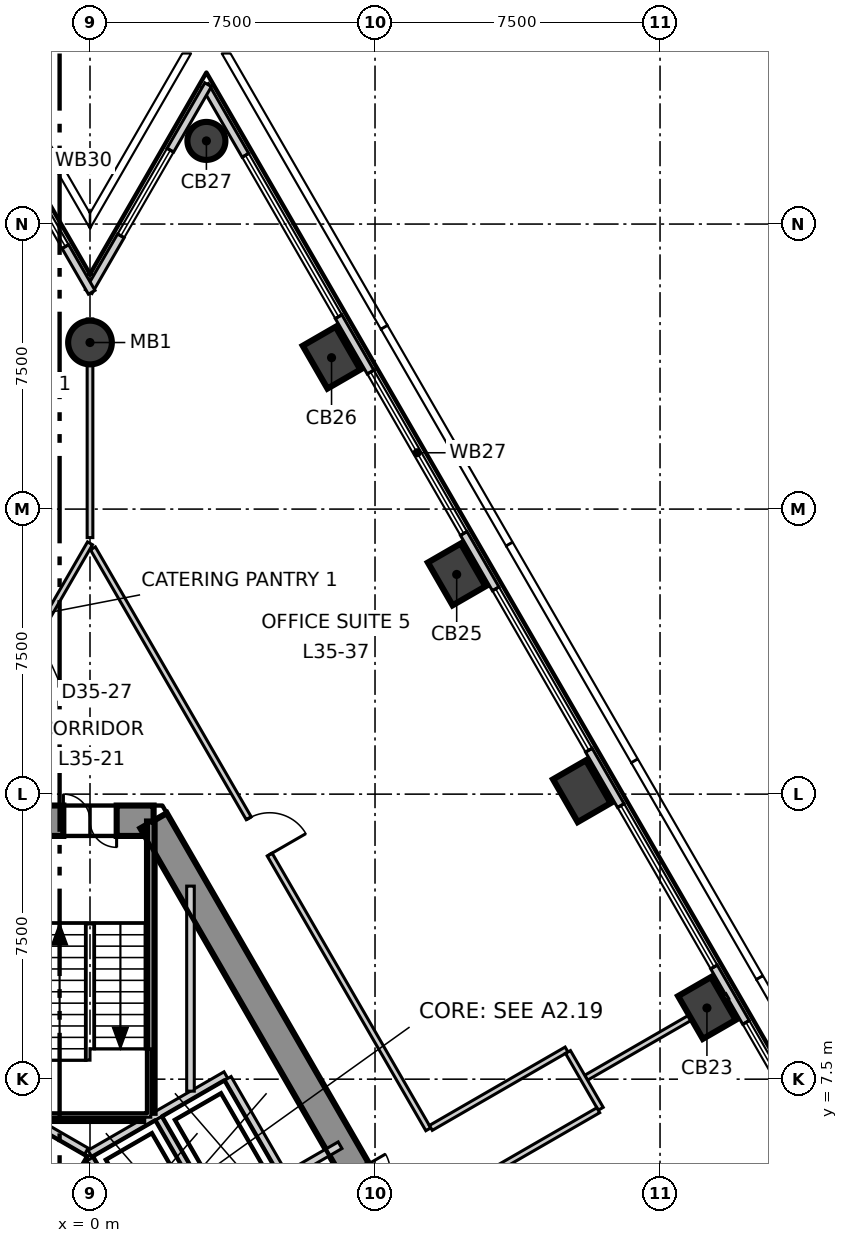
"""IFC4 building model, lengths in metres.
Left out: names, types, materials, properties, quantities, classifications, styles, units other than length and angle.
Written with IfcOpenShell. Run it as: python <this file> out.ifc"""

import sys

from ifc_helpers import new_model, si_unit, direction, frame, frame_2d, origin, origin_2d, place, context, subcontext, project, spatial, polyline, rectangle, circle, outline, extrude, element, fill, save


model = new_model("IFC4")
c1 = context("Model", 3, precision=1e-05, world=origin(), true_north=direction((0.0, 1.0)))
c2 = subcontext(c1, "Body", "Model", "MODEL_VIEW")
j1 = project(units=[si_unit("LENGTHUNIT", "METRE"), si_unit("PLANEANGLEUNIT", "RADIAN")], contexts=[c1])
p1 = place(None, origin())
s1 = spatial("IfcSite", under=j1, at=p1, CompositionType="ELEMENT")
p2 = place(p1, origin())
s2 = spatial("IfcBuilding", under=s1, at=p2, CompositionType="ELEMENT")
p3 = place(p2, frame((0.0, 0.0, 152.3)))
s3 = spatial("IfcBuildingStorey", under=s2, at=p3, CompositionType="ELEMENT", Elevation=152.3)
p4 = place(p3, frame((1.674, 14.3, -0.3), z_axis=(0.0, 0.0, 1.0), x_axis=(-1.0, 0.0, 0.0)))
e1 = element("IfcWall", 1, at=p4, inside=s3, PredefinedType="SHEAR", context=c2, shape_type="SweptSolid", body=[
    extrude(outline(polyline([(-0.231, -0.4), (1.674, -0.4), (3.579, -0.4), (3.117, 0.4), (1.674, 0.4), (0.231, 0.4), (-0.231, -0.4)])), origin(), (0.0, 0.0, 1.0), 4.0),
])
p5 = place(p4, frame((0.974, 0.0, 0.3)))
e2 = element("IfcOpeningElement", 2, at=p5, cuts=e1, PredefinedType="OPENING", context=c2, shape_type="SweptSolid", body=[
    extrude(rectangle(XDim=1.4, YDim=2.1, at=frame_2d((0.7, 1.05))), frame((0.0, 0.41, 0.0), z_axis=(0.0, -1.0, 0.0), x_axis=(1.0, 0.0, 0.0)), (0.0, 0.0, 1.0), 0.82),
])
p6 = place(p3, frame((13.221, -5.7, -0.3), z_axis=(0.0, 0.0, 1.0), x_axis=(-0.499995765644, 0.866027848477, 0.0)))
e3 = element("IfcWall", 3, at=p6, inside=s3, PredefinedType="SHEAR", context=c2, shape_type="SweptSolid", body=[
    extrude(outline(polyline([(-0.231, -0.4), (1.732, -0.4), (3.695, -0.4), (5.658, -0.4), (7.621, -0.4), (9.584, -0.4), (11.547, -0.4), (13.51, -0.4), (15.473, -0.4), (17.436, -0.4), (19.399, -0.4), (21.362, -0.4), (23.325, -0.4), (22.863, 0.4), (20.977, 0.4), (19.091, 0.4), (17.205, 0.4), (15.319, 0.4), (13.433, 0.4), (11.547, 0.4), (9.661, 0.4), (7.775, 0.4), (5.889, 0.4), (4.003, 0.4), (2.117, 0.4), (0.231, 0.4), (-0.231, -0.4)])), origin(), (0.0, 0.0, 1.0), 4.0),
])
p7 = place(p6, frame((10.647, 0.0, 0.3)))
e4 = element("IfcOpeningElement", 4, at=p7, cuts=e3, PredefinedType="OPENING", context=c2, shape_type="SweptSolid", body=[
    extrude(rectangle(XDim=1.8, YDim=2.1, at=frame_2d((0.9, 1.05))), frame((0.0, 0.41, 0.0), z_axis=(0.0, -1.0, 0.0), x_axis=(1.0, 0.0, 0.0)), (0.0, 0.0, 1.0), 0.82),
])
for number, where, z_axis, x_axis in (
    (5, (16.234, 9.373, -0.3), (0.0, 0.0, 1.0), (-0.5, 0.866, 0.0)),
    (6, (12.942, 15.077, -0.3), (0.0, 0.0, 1.0), (-0.5, 0.866, 0.0)),
    (7, (9.649, 20.781, -0.3), (0.0, 0.0, 1.0), (-0.5, 0.866, 0.0)),
    (8, (6.356, 26.484, -0.3), (0.0, 0.0, 1.0), (-0.5, 0.866, 0.0)),
):
    element("IfcColumn", number, at=place(p3, frame(where, z_axis=z_axis, x_axis=x_axis)), inside=s3, PredefinedType="COLUMN", context=c2, shape_type="SweptSolid", body=[
        extrude(rectangle(XDim=1.3, YDim=1.0, at=origin_2d()), origin(), (0.0, 0.0, 1.0), 4.0),
    ])
p8 = place(p3, frame((3.063, 32.188, -0.3), z_axis=(0.0, 0.0, 1.0), x_axis=(-0.5, 0.866025403784, 0.0)))
e9 = element("IfcColumn", 9, at=p8, inside=s3, PredefinedType="COLUMN", context=c2, shape_type="SweptSolid", body=[
    extrude(circle(Radius=0.5, at=origin_2d()), origin(), (0.0, 0.0, 1.0), 4.0),
])
p9 = place(p3, frame((0.0, 26.883, -0.3), z_axis=(0.0, 0.0, 1.0), x_axis=(1.0, 0.0, 0.0)))
e10 = element("IfcColumn", 10, at=p9, inside=s3, PredefinedType="COLUMN", context=c2, shape_type="SweptSolid", body=[
    extrude(circle(Radius=0.575, at=origin_2d()), origin(), (0.0, 0.0, 1.0), 4.0),
])
p10 = place(p3, frame((30.664, -14.22, 0.0), z_axis=(0.0, 0.0, 1.0), x_axis=(-0.499984613623, 0.866034286931, 0.0)))
e11 = element("IfcWall", 11, at=p10, inside=s3, PredefinedType="ELEMENTEDWALL", context=c2, shape_type="SweptSolid", body=[
    extrude(rectangle(XDim=55.274, YDim=0.2, at=frame_2d((27.637, 0.0))), origin(), (0.0, 0.0, 1.0), 3.7),
])
p11 = place(p10, frame((2.146, 0.0, 0.9)))
e12 = element("IfcOpeningElement", 12, at=p11, cuts=e11, PredefinedType="OPENING", context=c2, shape_type="SweptSolid", body=[
    extrude(rectangle(XDim=4.9, YDim=2.5, at=frame_2d((2.45, 1.25))), frame((0.0, 0.11, 0.0), z_axis=(0.0, -1.0, 0.0), x_axis=(1.0, 0.0, 0.0)), (0.0, 0.0, 1.0), 0.22),
])
p12 = place(p10, frame((8.732, 0.0, 0.9)))
e13 = element("IfcOpeningElement", 13, at=p12, cuts=e11, PredefinedType="OPENING", context=c2, shape_type="SweptSolid", body=[
    extrude(rectangle(XDim=4.9, YDim=2.5, at=frame_2d((2.45, 1.25))), frame((0.0, 0.11, 0.0), z_axis=(0.0, -1.0, 0.0), x_axis=(1.0, 0.0, 0.0)), (0.0, 0.0, 1.0), 0.22),
])
p13 = place(p10, frame((15.318, 0.0, 0.9)))
e14 = element("IfcOpeningElement", 14, at=p13, cuts=e11, PredefinedType="OPENING", context=c2, shape_type="SweptSolid", body=[
    extrude(rectangle(XDim=4.9, YDim=2.5, at=frame_2d((2.45, 1.25))), frame((0.0, 0.11, 0.0), z_axis=(0.0, -1.0, 0.0), x_axis=(1.0, 0.0, 0.0)), (0.0, 0.0, 1.0), 0.22),
])
p14 = place(p10, frame((21.904, 0.0, 0.9)))
e15 = element("IfcOpeningElement", 15, at=p14, cuts=e11, PredefinedType="OPENING", context=c2, shape_type="SweptSolid", body=[
    extrude(rectangle(XDim=4.9, YDim=2.5, at=frame_2d((2.45, 1.25))), frame((0.0, 0.11, 0.0), z_axis=(0.0, -1.0, 0.0), x_axis=(1.0, 0.0, 0.0)), (0.0, 0.0, 1.0), 0.22),
])
p15 = place(p10, frame((28.49, 0.0, 0.9)))
e16 = element("IfcOpeningElement", 16, at=p15, cuts=e11, PredefinedType="OPENING", context=c2, shape_type="SweptSolid", body=[
    extrude(rectangle(XDim=4.9, YDim=2.5, at=frame_2d((2.45, 1.25))), frame((0.0, 0.11, 0.0), z_axis=(0.0, -1.0, 0.0), x_axis=(1.0, 0.0, 0.0)), (0.0, 0.0, 1.0), 0.22),
])
p16 = place(p10, frame((35.076, 0.0, 0.9)))
e17 = element("IfcOpeningElement", 17, at=p16, cuts=e11, PredefinedType="OPENING", context=c2, shape_type="SweptSolid", body=[
    extrude(rectangle(XDim=4.9, YDim=2.5, at=frame_2d((2.45, 1.25))), frame((0.0, 0.11, 0.0), z_axis=(0.0, -1.0, 0.0), x_axis=(1.0, 0.0, 0.0)), (0.0, 0.0, 1.0), 0.22),
])
p17 = place(p10, frame((41.662, 0.0, 0.9)))
e18 = element("IfcOpeningElement", 18, at=p17, cuts=e11, PredefinedType="OPENING", context=c2, shape_type="SweptSolid", body=[
    extrude(rectangle(XDim=4.9, YDim=2.5, at=frame_2d((2.45, 1.25))), frame((0.0, 0.11, 0.0), z_axis=(0.0, -1.0, 0.0), x_axis=(1.0, 0.0, 0.0)), (0.0, 0.0, 1.0), 0.22),
])
p18 = place(p10, frame((48.248, 0.0, 0.9)))
e19 = element("IfcOpeningElement", 19, at=p18, cuts=e11, PredefinedType="OPENING", context=c2, shape_type="SweptSolid", body=[
    extrude(rectangle(XDim=4.9, YDim=2.5, at=frame_2d((2.45, 1.25))), frame((0.0, 0.11, 0.0), z_axis=(0.0, -1.0, 0.0), x_axis=(1.0, 0.0, 0.0)), (0.0, 0.0, 1.0), 0.22),
])
p19 = place(p3, frame((3.108, 33.666, 0.0), z_axis=(0.0, 0.0, 1.0), x_axis=(-0.499961152228, -0.866047831394, 0.0)))
e20 = element("IfcWall", 20, at=p19, inside=s3, PredefinedType="ELEMENTEDWALL", context=c2, shape_type="SweptSolid", body=[
    extrude(rectangle(XDim=6.286, YDim=0.2, at=frame_2d((3.143, 0.0))), origin(), (0.0, 0.0, 1.0), 3.7),
])
p20 = place(p19, frame((1.99, 0.0, 0.9)))
e21 = element("IfcOpeningElement", 21, at=p20, cuts=e20, PredefinedType="OPENING", context=c2, shape_type="SweptSolid", body=[
    extrude(rectangle(XDim=2.6, YDim=2.5, at=frame_2d((1.3, 1.25))), frame((0.0, 0.11, 0.0), z_axis=(0.0, -1.0, 0.0), x_axis=(1.0, 0.0, 0.0)), (0.0, 0.0, 1.0), 0.22),
])
p21 = place(p3, frame((0.045, 28.205, 0.0), z_axis=(0.0, 0.0, 1.0), x_axis=(-0.499977969162, 0.866038122921, 0.0)))
e22 = element("IfcWall", 22, at=p21, inside=s3, PredefinedType="ELEMENTEDWALL", context=c2, shape_type="SweptSolid", body=[
    extrude(rectangle(XDim=6.286, YDim=0.2, at=frame_2d((3.143, 0.0))), origin(), (0.0, 0.0, 1.0), 3.7),
])
p22 = place(p21, frame((1.39, 0.0, 0.9)))
e23 = element("IfcOpeningElement", 23, at=p22, cuts=e22, PredefinedType="OPENING", context=c2, shape_type="SweptSolid", body=[
    extrude(rectangle(XDim=2.6, YDim=2.5, at=frame_2d((1.3, 1.25))), frame((0.0, 0.11, 0.0), z_axis=(0.0, -1.0, 0.0), x_axis=(1.0, 0.0, 0.0)), (0.0, 0.0, 1.0), 0.22),
])
p23 = place(p3, frame((13.055, 7.538, 0.0), z_axis=(0.0, 0.0, 1.0), x_axis=(0.866070942811, 0.499921115796, 0.0)))
e24 = element("IfcWall", 24, at=p23, inside=s3, PredefinedType="PARTITIONING", context=c2, shape_type="SweptSolid", body=[
    extrude(rectangle(XDim=4.291, YDim=0.15, at=frame_2d((2.146, 0.0))), origin(), (0.0, 0.0, 1.0), 3.2),
])
p24 = place(p3, frame((-8.902, 6.181, 0.0), z_axis=(0.0, 0.0, 1.0), x_axis=(0.499992688384, 0.866029625107, 0.0)))
e25 = element("IfcWall", 25, at=p24, inside=s3, PredefinedType="PARTITIONING", context=c2, shape_type="SweptSolid", body=[
    extrude(rectangle(XDim=17.804, YDim=0.15, at=frame_2d((8.902, 0.0))), origin(), (0.0, 0.0, 1.0), 3.7),
])
p25 = place(p24, frame((14.554, 0.0, 0.0)))
e26 = element("IfcOpeningElement", 26, at=p25, cuts=e25, PredefinedType="OPENING", context=c2, shape_type="SweptSolid", body=[
    extrude(rectangle(XDim=1.0, YDim=2.1, at=frame_2d((0.5, 1.05))), frame((0.0, 0.085, 0.0), z_axis=(0.0, -1.0, 0.0), x_axis=(1.0, 0.0, 0.0)), (0.0, 0.0, 1.0), 0.17),
])
p26 = place(p24, frame((5.62, 0.0, 0.0)))
e27 = element("IfcOpeningElement", 27, at=p26, cuts=e25, PredefinedType="OPENING", context=c2, shape_type="SweptSolid", body=[
    extrude(rectangle(XDim=1.1, YDim=2.1, at=frame_2d((0.55, 1.05))), frame((0.0, 0.085, 0.0), z_axis=(0.0, -1.0, 0.0), x_axis=(1.0, 0.0, 0.0)), (0.0, 0.0, 1.0), 0.17),
])
p27 = place(p3, frame((0.0, 21.75, 0.0), z_axis=(0.0, 0.0, 1.0), x_axis=(0.0, 1.0, 0.0)))
e28 = element("IfcWall", 28, at=p27, inside=s3, PredefinedType="PARTITIONING", context=c2, shape_type="SweptSolid", body=[
    extrude(rectangle(XDim=5.753, YDim=0.15, at=frame_2d((2.876, 0.0))), origin(), (0.0, 0.0, 1.0), 3.2),
])
p28 = place(p3, frame((0.076, 21.468, 0.0), z_axis=(0.0, 0.0, 1.0), x_axis=(0.500006592492, -0.866021597574, 0.0)))
e29 = element("IfcWall", 29, at=p28, inside=s3, PredefinedType="PARTITIONING", context=c2, shape_type="SweptSolid", body=[
    extrude(rectangle(XDim=17.652, YDim=0.15, at=frame_2d((8.826, 0.0))), origin(), (0.0, 0.0, 1.0), 3.7),
])
p29 = place(p28, frame((8.204, 0.0, 0.0)))
e30 = element("IfcOpeningElement", 30, at=p29, cuts=e29, PredefinedType="OPENING", context=c2, shape_type="SweptSolid", body=[
    extrude(rectangle(XDim=1.1, YDim=2.1, at=frame_2d((0.55, 1.05))), frame((0.0, 0.085, 0.0), z_axis=(0.0, -1.0, 0.0), x_axis=(1.0, 0.0, 0.0)), (0.0, 0.0, 1.0), 0.17),
])
p30 = place(p3, frame((8.969, 6.218, 0.0), z_axis=(0.0, 0.0, 1.0), x_axis=(0.865997263264, 0.500048737644, 0.0)))
e31 = element("IfcWall", 31, at=p30, inside=s3, PredefinedType="PARTITIONING", context=c2, shape_type="SweptSolid", body=[
    extrude(rectangle(XDim=4.124, YDim=0.15, at=frame_2d((2.062, 0.0))), origin(), (0.0, 0.0, 1.0), 3.7),
])
p31 = place(p3, frame((12.578, 8.215, 0.0), z_axis=(0.0, 0.0, 1.0), x_axis=(0.499746958151, -0.866171448282, 0.0)))
e32 = element("IfcWall", 32, at=p31, inside=s3, PredefinedType="PARTITIONING", context=c2, shape_type="SweptSolid", body=[
    extrude(rectangle(XDim=1.725, YDim=0.15, at=frame_2d((0.863, 0.0))), origin(), (0.0, 0.0, 1.0), 3.7),
])
p32 = place(p3, frame((9.869, 4.659, 0.0), z_axis=(0.0, 0.0, 1.0), x_axis=(0.866033948129, 0.499985200469, 0.0)))
e33 = element("IfcWall", 33, at=p32, inside=s3, PredefinedType="PARTITIONING", context=c2, shape_type="SweptSolid", body=[
    extrude(rectangle(XDim=4.048, YDim=0.15, at=frame_2d((2.024, 0.0))), origin(), (0.0, 0.0, 1.0), 3.7),
])
p33 = place(p3, frame((-0.002, 5.541, 0.0), z_axis=(0.0, 0.0, 1.0), x_axis=(0.86600155993, 0.500041296494, 0.0)))
e34 = element("IfcWall", 34, at=p33, inside=s3, PredefinedType="SOLIDWALL", context=c2, shape_type="SweptSolid", body=[
    extrude(rectangle(XDim=4.132, YDim=0.2, at=frame_2d((2.066, 0.0))), origin(), (0.0, 0.0, 1.0), 3.7),
])
p34 = place(p3, frame((0.0, 5.4, 0.0), z_axis=(0.0, 0.0, 1.0), x_axis=(0.500103862429, -0.865965430478, 0.0)))
e35 = element("IfcWall", 35, at=p34, inside=s3, PredefinedType="SOLIDWALL", context=c2, shape_type="SweptSolid", body=[
    extrude(rectangle(XDim=2.973, YDim=0.2, at=frame_2d((1.487, 0.0))), origin(), (0.0, 0.0, 1.0), 3.7),
])
p35 = place(p34, frame((0.937, 0.0, 0.0)))
e36 = element("IfcOpeningElement", 36, at=p35, cuts=e35, PredefinedType="OPENING", context=c2, shape_type="SweptSolid", body=[
    extrude(rectangle(XDim=1.1, YDim=2.1, at=frame_2d((0.55, 1.05))), frame((0.0, 0.11, 0.0), z_axis=(0.0, -1.0, 0.0), x_axis=(1.0, 0.0, 0.0)), (0.0, 0.0, 1.0), 0.22),
])
p36 = place(p3, frame((1.577, 2.874, 0.0), z_axis=(0.0, 0.0, 1.0), x_axis=(0.866073694534, 0.499916348638, 0.0)))
e37 = element("IfcWall", 37, at=p36, inside=s3, PredefinedType="SOLIDWALL", context=c2, shape_type="SweptSolid", body=[
    extrude(rectangle(XDim=5.777, YDim=0.2, at=frame_2d((2.888, 0.0))), origin(), (0.0, 0.0, 1.0), 3.7),
])
p37 = place(p36, frame((2.497, 0.0, 0.0)))
e38 = element("IfcOpeningElement", 38, at=p37, cuts=e37, PredefinedType="OPENING", context=c2, shape_type="SweptSolid", body=[
    extrude(rectangle(XDim=1.1, YDim=2.1, at=frame_2d((0.55, 1.05))), frame((0.0, 0.11, 0.0), z_axis=(0.0, -1.0, 0.0), x_axis=(1.0, 0.0, 0.0)), (0.0, 0.0, 1.0), 0.22),
])
for number, where, z_axis, x_axis in (
    (39, (1.807, 6.47, 0.0), (0.0, 0.0, 1.0), (0.5, -0.866, 0.0)),
    (40, (3.626, 7.52, 0.0), (0.0, 0.0, 1.0), (0.5, -0.866, 0.0)),
):
    element("IfcWall", number, at=place(p3, frame(where, z_axis=z_axis, x_axis=x_axis)), inside=s3, PredefinedType="SOLIDWALL", context=c2, shape_type="SweptSolid", body=[
        extrude(rectangle(XDim=2.9, YDim=0.2, at=frame_2d((1.45, 0.0))), origin(), (0.0, 0.0, 1.0), 3.7),
    ])
p38 = place(p3, frame((-1.67, 6.507, 0.0), z_axis=(0.0, 0.0, 1.0), x_axis=(0.865941441609, -0.500145398563, 0.0)))
e41 = element("IfcWall", 41, at=p38, inside=s3, PredefinedType="SOLIDWALL", context=c2, shape_type="SweptSolid", body=[
    extrude(rectangle(XDim=1.815, YDim=0.2, at=frame_2d((0.908, 0.0))), origin(), (0.0, 0.0, 1.0), 3.7),
])
p39 = place(p3, frame((-1.438, 2.909, 0.0), z_axis=(0.0, 0.0, 1.0), x_axis=(0.499829630636, 0.866123744241, 0.0)))
e42 = element("IfcWall", 42, at=p39, inside=s3, PredefinedType="SOLIDWALL", context=c2, shape_type="SweptSolid", body=[
    extrude(rectangle(XDim=2.761, YDim=0.2, at=frame_2d((1.38, 0.0))), origin(), (0.0, 0.0, 1.0), 3.7),
])
p40 = place(p3, frame((2.644, 7.185, 0.0), z_axis=(0.0, 0.0, 1.0), x_axis=(0.0, 1.0, 0.0)))
e43 = element("IfcWall", 43, at=p40, inside=s3, PredefinedType="SOLIDWALL", context=c2, shape_type="SweptSolid", body=[
    extrude(rectangle(XDim=5.395, YDim=0.2, at=frame_2d((2.698, 0.0))), origin(), (0.0, 0.0, 1.0), 3.7),
])
p41 = place(p3, frame((1.6, 6.615, 0.0), z_axis=(0.0, 0.0, 1.0), x_axis=(0.0, 1.0, 0.0)))
e44 = element("IfcWall", 44, at=p41, inside=s3, PredefinedType="SOLIDWALL", context=c2, shape_type="SweptSolid", body=[
    extrude(rectangle(XDim=7.665, YDim=0.2, at=frame_2d((3.833, 0.0))), origin(), (0.0, 0.0, 1.0), 3.7),
])
p42 = place(p3, frame((-1.4, 6.5, 0.0), z_axis=(0.0, 0.0, 1.0), x_axis=(1.0, 0.0, 0.0)))
e45 = element("IfcWall", 45, at=p42, inside=s3, PredefinedType="SOLIDWALL", context=c2, shape_type="SweptSolid", body=[
    extrude(rectangle(XDim=2.8, YDim=0.2, at=frame_2d((1.4, 0.0))), origin(), (0.0, 0.0, 1.0), 3.7),
])
p43 = place(p14, origin())
e46 = element("IfcWindow", 46, at=p43, inside=s3, PartitioningType="SINGLE_PANEL", PredefinedType="WINDOW", context=c2, shape_type="SweptSolid", body=[
    extrude(rectangle(XDim=4.9, YDim=2.5, at=frame_2d((2.45, 1.25))), frame((0.0, 0.03, 0.0), z_axis=(0.0, -1.0, 0.0), x_axis=(1.0, 0.0, 0.0)), (0.0, 0.0, 1.0), 0.06),
])
fill(e15, e46)
p44 = place(p15, origin())
e47 = element("IfcWindow", 47, at=p44, inside=s3, PartitioningType="SINGLE_PANEL", PredefinedType="WINDOW", context=c2, shape_type="SweptSolid", body=[
    extrude(rectangle(XDim=4.9, YDim=2.5, at=frame_2d((2.45, 1.25))), frame((0.0, 0.03, 0.0), z_axis=(0.0, -1.0, 0.0), x_axis=(1.0, 0.0, 0.0)), (0.0, 0.0, 1.0), 0.06),
])
fill(e16, e47)
p45 = place(p16, origin())
e48 = element("IfcWindow", 48, at=p45, inside=s3, PartitioningType="SINGLE_PANEL", PredefinedType="WINDOW", context=c2, shape_type="SweptSolid", body=[
    extrude(rectangle(XDim=4.9, YDim=2.5, at=frame_2d((2.45, 1.25))), frame((0.0, 0.03, 0.0), z_axis=(0.0, -1.0, 0.0), x_axis=(1.0, 0.0, 0.0)), (0.0, 0.0, 1.0), 0.06),
])
fill(e17, e48)
p46 = place(p17, origin())
e49 = element("IfcWindow", 49, at=p46, inside=s3, PartitioningType="SINGLE_PANEL", PredefinedType="WINDOW", context=c2, shape_type="SweptSolid", body=[
    extrude(rectangle(XDim=4.9, YDim=2.5, at=frame_2d((2.45, 1.25))), frame((0.0, 0.03, 0.0), z_axis=(0.0, -1.0, 0.0), x_axis=(1.0, 0.0, 0.0)), (0.0, 0.0, 1.0), 0.06),
])
fill(e18, e49)
p47 = place(p18, origin())
e50 = element("IfcWindow", 50, at=p47, inside=s3, PartitioningType="SINGLE_PANEL", PredefinedType="WINDOW", context=c2, shape_type="SweptSolid", body=[
    extrude(rectangle(XDim=4.9, YDim=2.5, at=frame_2d((2.45, 1.25))), frame((0.0, 0.03, 0.0), z_axis=(0.0, -1.0, 0.0), x_axis=(1.0, 0.0, 0.0)), (0.0, 0.0, 1.0), 0.06),
])
fill(e19, e50)
p48 = place(p20, origin())
e51 = element("IfcWindow", 51, at=p48, inside=s3, PartitioningType="SINGLE_PANEL", PredefinedType="WINDOW", context=c2, shape_type="SweptSolid", body=[
    extrude(rectangle(XDim=2.6, YDim=2.5, at=frame_2d((1.3, 1.25))), frame((0.0, 0.03, 0.0), z_axis=(0.0, -1.0, 0.0), x_axis=(1.0, 0.0, 0.0)), (0.0, 0.0, 1.0), 0.06),
])
fill(e21, e51)
p49 = place(p22, origin())
e52 = element("IfcWindow", 52, at=p49, inside=s3, PartitioningType="SINGLE_PANEL", PredefinedType="WINDOW", context=c2, shape_type="SweptSolid", body=[
    extrude(rectangle(XDim=2.6, YDim=2.5, at=frame_2d((1.3, 1.25))), frame((0.0, 0.03, 0.0), z_axis=(0.0, -1.0, 0.0), x_axis=(1.0, 0.0, 0.0)), (0.0, 0.0, 1.0), 0.06),
])
fill(e23, e52)
p50 = place(p29, origin())
e53 = element("IfcDoor", 53, at=p50, inside=s3, OperationType="SINGLE_SWING_LEFT", PredefinedType="DOOR", context=c2, shape_type="SweptSolid", body=[
    extrude(rectangle(XDim=1.1, YDim=2.1, at=frame_2d((0.55, 1.05))), frame((0.0, 0.025, 0.0), z_axis=(0.0, -1.0, 0.0), x_axis=(1.0, 0.0, 0.0)), (0.0, 0.0, 1.0), 0.05),
])
fill(e30, e53)
p51 = place(p5, origin())
e54 = element("IfcDoor", 54, at=p51, inside=s3, OperationType="DOUBLE_DOOR_SINGLE_SWING", PredefinedType="DOOR", context=c2, shape_type="SweptSolid", body=[
    extrude(rectangle(XDim=1.4, YDim=2.1, at=frame_2d((0.7, 1.05))), frame((0.0, 0.025, 0.0), z_axis=(0.0, -1.0, 0.0), x_axis=(1.0, 0.0, 0.0)), (0.0, 0.0, 1.0), 0.05),
])
fill(e2, e54)
save(model, sys.argv[1])
